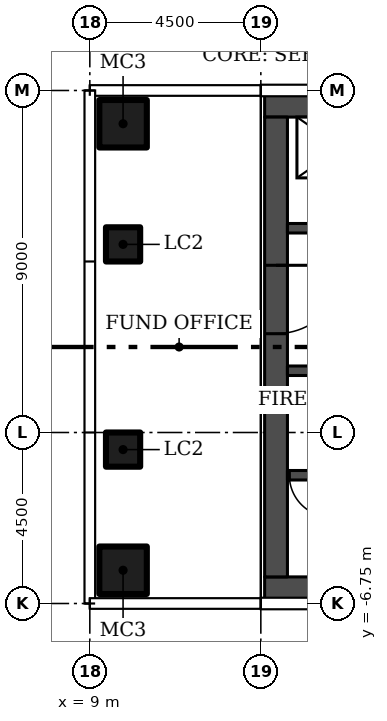
"""IFC4 building model, lengths in metres.
Left out: names, types, materials, properties, quantities, classifications, styles, units other than length and angle.
Written with IfcOpenShell. Run it as: python <this file> out.ifc"""

import sys

from ifc_helpers import new_model, si_unit, direction, frame, frame_2d, origin, origin_2d, place, context, subcontext, project, spatial, rectangle, hollow_rectangle, extrude, element, fill, save


model = new_model("IFC4")
c1 = context("Model", 3, precision=1e-05, world=origin(), true_north=direction((0.0, 1.0)))
c2 = subcontext(c1, "Body", "Model", "MODEL_VIEW")
j1 = project(units=[si_unit("LENGTHUNIT", "METRE"), si_unit("PLANEANGLEUNIT", "RADIAN")], contexts=[c1])
p1 = place(None, origin())
s1 = spatial("IfcSite", under=j1, at=p1, CompositionType="ELEMENT")
p2 = place(p1, origin())
s2 = spatial("IfcBuilding", under=s1, at=p2, CompositionType="ELEMENT")
p3 = place(p2, frame((0.0, 0.0, 89.7)))
s3 = spatial("IfcBuildingStorey", under=s2, at=p3, CompositionType="ELEMENT", Elevation=89.7)
for number, where in (
    (1, (9.875, -5.875, 0.0)),
    (2, (9.875, 5.875, 0.0)),
):
    element("IfcColumn", number, at=place(p3, frame(where)), inside=s3, PredefinedType="COLUMN", context=c2, shape_type="SweptSolid", body=[
        extrude(hollow_rectangle(XDim=1.25, YDim=1.25, WallThickness=0.05, at=origin_2d()), origin(), (0.0, 0.0, 1.0), 3.55),
    ])
for number, where in (
    (3, (9.875, -2.7, 0.0)),
    (4, (9.875, 2.7, 0.0)),
):
    element("IfcColumn", number, at=place(p3, frame(where)), inside=s3, PredefinedType="COLUMN", context=c2, shape_type="SweptSolid", body=[
        extrude(hollow_rectangle(XDim=0.9, YDim=0.9, WallThickness=0.036, at=origin_2d()), origin(), (0.0, 0.0, 1.0), 3.55),
    ])
for number, where in (
    (5, (13.6, -6.35, 0.0)),
    (6, (13.6, 6.35, 0.0)),
):
    element("IfcWall", number, at=place(p3, frame(where)), inside=s3, PredefinedType="SHEAR", context=c2, shape_type="SweptSolid", body=[
        extrude(rectangle(XDim=13.3, YDim=0.6, at=frame_2d((6.65, 0.0))), origin(), (0.0, 0.0, 1.0), 3.55),
    ])
p4 = place(p3, frame((13.9, 6.05, 0.0), z_axis=(0.0, 0.0, 1.0), x_axis=(0.0, -1.0, 0.0)))
e7 = element("IfcWall", 7, at=p4, inside=s3, PredefinedType="SHEAR", context=c2, shape_type="SweptSolid", body=[
    extrude(rectangle(XDim=12.1, YDim=0.6, at=frame_2d((6.05, 0.0))), origin(), (0.0, 0.0, 1.0), 3.55),
])
p5 = place(p4, frame((3.9, 0.0, 0.0)))
e8 = element("IfcOpeningElement", 8, at=p5, cuts=e7, PredefinedType="OPENING", context=c2, shape_type="SweptSolid", body=[
    extrude(rectangle(XDim=1.8, YDim=2.4, at=frame_2d((0.9, 1.2))), frame((0.0, 0.31, 0.0), z_axis=(0.0, -1.0, 0.0), x_axis=(1.0, 0.0, 0.0)), (0.0, 0.0, 1.0), 0.62),
])
p6 = place(p3, frame((26.3, -3.375, 0.0), z_axis=(0.0, 0.0, 1.0), x_axis=(-1.0, 0.0, 0.0)))
e9 = element("IfcWall", 9, at=p6, inside=s3, PredefinedType="SHEAR", context=c2, shape_type="SweptSolid", body=[
    extrude(rectangle(XDim=12.1, YDim=0.25, at=frame_2d((6.05, 0.0))), origin(), (0.0, 0.0, 1.0), 3.55),
])
p7 = place(p6, frame((10.95, 0.0, 0.0)))
e10 = element("IfcOpeningElement", 10, at=p7, cuts=e9, PredefinedType="OPENING", context=c2, shape_type="SweptSolid", body=[
    extrude(rectangle(XDim=1.1, YDim=2.1, at=frame_2d((0.55, 1.05))), frame((0.0, 0.135, 0.0), z_axis=(0.0, -1.0, 0.0), x_axis=(1.0, 0.0, 0.0)), (0.0, 0.0, 1.0), 0.27),
])
p8 = place(p3, frame((26.3, -0.625, 0.0), z_axis=(0.0, 0.0, 1.0), x_axis=(-1.0, 0.0, 0.0)))
e11 = element("IfcWall", 11, at=p8, inside=s3, PredefinedType="SHEAR", context=c2, shape_type="SweptSolid", body=[
    extrude(rectangle(XDim=12.1, YDim=0.25, at=frame_2d((6.05, 0.0))), origin(), (0.0, 0.0, 1.0), 3.55),
])
p9 = place(p8, frame((8.65, 0.0, 0.0)))
e12 = element("IfcOpeningElement", 12, at=p9, cuts=e11, PredefinedType="OPENING", context=c2, shape_type="SweptSolid", body=[
    extrude(rectangle(XDim=1.2, YDim=2.1, at=frame_2d((0.6, 1.05))), frame((0.0, 0.135, 0.0), z_axis=(0.0, -1.0, 0.0), x_axis=(1.0, 0.0, 0.0)), (0.0, 0.0, 1.0), 0.27),
])
p10 = place(p8, frame((2.0, 0.0, 0.0)))
e13 = element("IfcOpeningElement", 13, at=p10, cuts=e11, PredefinedType="OPENING", context=c2, shape_type="SweptSolid", body=[
    extrude(rectangle(XDim=0.9, YDim=2.1, at=frame_2d((0.45, 1.05))), frame((0.0, 0.135, 0.0), z_axis=(0.0, -1.0, 0.0), x_axis=(1.0, 0.0, 0.0)), (0.0, 0.0, 1.0), 0.27),
])
p11 = place(p8, frame((0.375, 0.0, 0.0)))
e14 = element("IfcOpeningElement", 14, at=p11, cuts=e11, PredefinedType="OPENING", context=c2, shape_type="SweptSolid", body=[
    extrude(rectangle(XDim=0.9, YDim=2.1, at=frame_2d((0.45, 1.05))), frame((0.0, 0.135, 0.0), z_axis=(0.0, -1.0, 0.0), x_axis=(1.0, 0.0, 0.0)), (0.0, 0.0, 1.0), 0.27),
])
p12 = place(p3, frame((14.2, 3.125, 0.0)))
e15 = element("IfcWall", 15, at=p12, inside=s3, PredefinedType="SHEAR", context=c2, shape_type="SweptSolid", body=[
    extrude(rectangle(XDim=12.1, YDim=0.25, at=frame_2d((6.05, 0.0))), origin(), (0.0, 0.0, 1.0), 3.55),
])
p13 = place(p12, frame((0.85, 0.0, 0.0)))
e16 = element("IfcOpeningElement", 16, at=p13, cuts=e15, PredefinedType="OPENING", context=c2, shape_type="SweptSolid", body=[
    extrude(rectangle(XDim=1.1, YDim=2.1, at=frame_2d((0.55, 1.05))), frame((0.0, 0.135, 0.0), z_axis=(0.0, -1.0, 0.0), x_axis=(1.0, 0.0, 0.0)), (0.0, 0.0, 1.0), 0.27),
])
p14 = place(p12, frame((3.9, 0.0, 0.0)))
e17 = element("IfcOpeningElement", 17, at=p14, cuts=e15, PredefinedType="OPENING", context=c2, shape_type="SweptSolid", body=[
    extrude(rectangle(XDim=1.1, YDim=2.1, at=frame_2d((0.55, 1.05))), frame((0.0, 0.135, 0.0), z_axis=(0.0, -1.0, 0.0), x_axis=(1.0, 0.0, 0.0)), (0.0, 0.0, 1.0), 0.27),
])
p15 = place(p5, origin())
e18 = element("IfcDoor", 18, at=p15, inside=s3, OperationType="DOUBLE_DOOR_SINGLE_SWING", PredefinedType="DOOR", context=c2, shape_type="SweptSolid", body=[
    extrude(rectangle(XDim=1.8, YDim=2.4, at=frame_2d((0.9, 1.2))), frame((0.0, 0.025, 0.0), z_axis=(0.0, -1.0, 0.0), x_axis=(1.0, 0.0, 0.0)), (0.0, 0.0, 1.0), 0.05),
])
fill(e8, e18)
p16 = place(p7, origin())
e19 = element("IfcDoor", 19, at=p16, inside=s3, OperationType="SINGLE_SWING_RIGHT", PredefinedType="DOOR", context=c2, shape_type="SweptSolid", body=[
    extrude(rectangle(XDim=1.1, YDim=2.1, at=frame_2d((0.55, 1.05))), frame((0.0, 0.025, 0.0), z_axis=(0.0, -1.0, 0.0), x_axis=(1.0, 0.0, 0.0)), (0.0, 0.0, 1.0), 0.05),
])
fill(e10, e19)
save(model, sys.argv[1])
